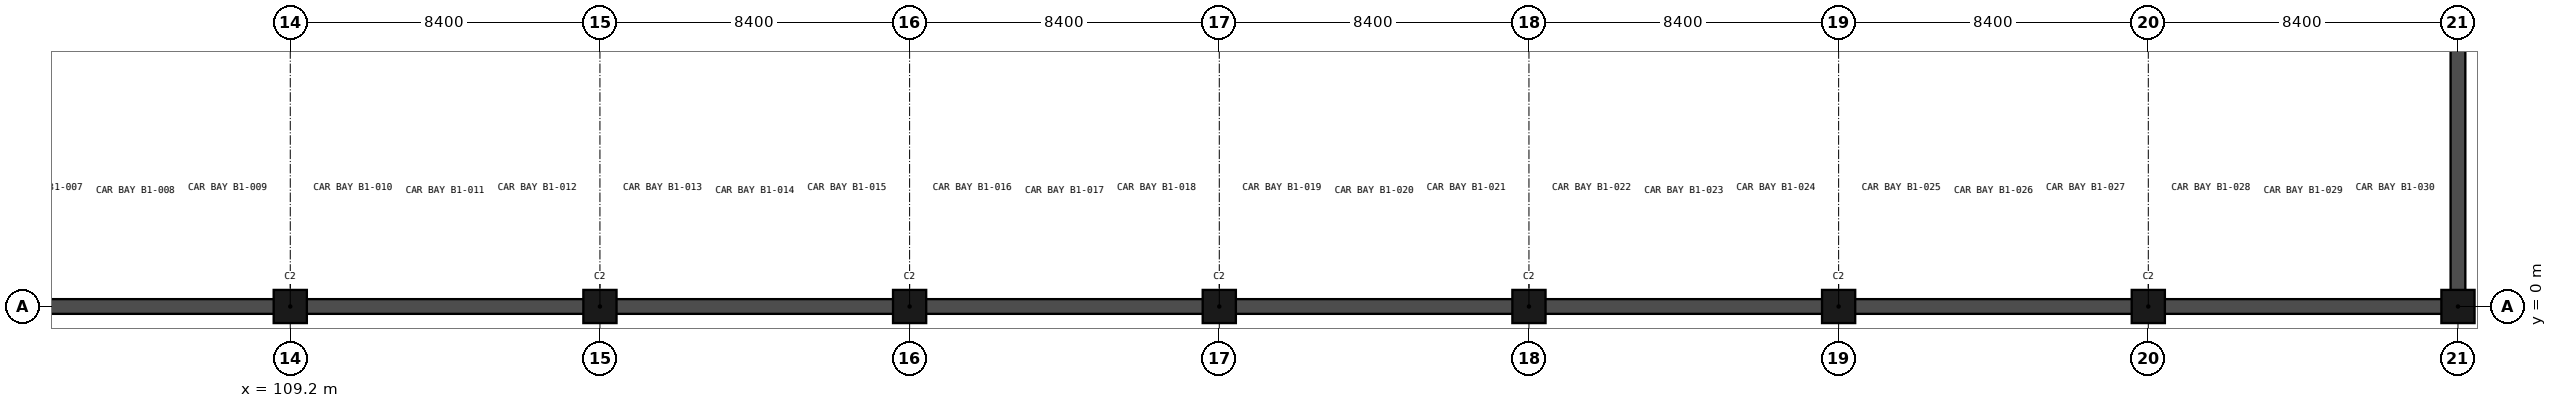
"""IFC4 building model, lengths in metres.
Left out: names, types, materials, properties, quantities, classifications, styles, units other than length and angle.
Written with IfcOpenShell. Run it as: python <this file> out.ifc"""

import sys

from ifc_helpers import new_model, si_unit, direction, frame, frame_2d, origin, origin_2d, place, context, subcontext, project, spatial, rectangle, extrude, element, save


model = new_model("IFC4")
c1 = context("Model", 3, precision=1e-05, world=origin(), true_north=direction((0.0, 1.0)))
c2 = subcontext(c1, "Body", "Model", "MODEL_VIEW")
j1 = project(units=[si_unit("LENGTHUNIT", "METRE"), si_unit("PLANEANGLEUNIT", "RADIAN")], contexts=[c1])
p1 = place(None, origin())
s1 = spatial("IfcSite", under=j1, at=p1, CompositionType="ELEMENT")
p2 = place(p1, origin())
s2 = spatial("IfcBuilding", under=s1, at=p2, CompositionType="ELEMENT")
p3 = place(p2, frame((0.0, 0.0, -4.8)))
s3 = spatial("IfcBuildingStorey", under=s2, at=p3, CompositionType="ELEMENT", Elevation=-4.8)
for number, where, z_axis, x_axis in (
    (1, (109.2, 0.0, -0.3), (0.0, 0.0, 1.0), (1.0, 0.0, 0.0)),
    (2, (117.6, 0.0, -0.3), (0.0, 0.0, 1.0), (1.0, 0.0, 0.0)),
    (3, (126.0, 0.0, -0.3), (0.0, 0.0, 1.0), (1.0, 0.0, 0.0)),
    (4, (134.4, 0.0, -0.3), (0.0, 0.0, 1.0), (1.0, 0.0, 0.0)),
    (5, (142.8, 0.0, -0.3), (0.0, 0.0, 1.0), (1.0, 0.0, 0.0)),
    (6, (151.2, 0.0, -0.3), (0.0, 0.0, 1.0), (1.0, 0.0, 0.0)),
    (7, (159.6, 0.0, -0.3), (0.0, 0.0, 1.0), (1.0, 0.0, 0.0)),
    (8, (168.0, 0.0, -0.3), (0.0, 0.0, 1.0), (1.0, 0.0, 0.0)),
):
    element("IfcColumn", number, at=place(p3, frame(where, z_axis=z_axis, x_axis=x_axis)), inside=s3, PredefinedType="COLUMN", context=c2, shape_type="SweptSolid", body=[
        extrude(rectangle(XDim=0.9, YDim=0.9, at=origin_2d()), origin(), (0.0, 0.0, 1.0), 4.8),
    ])
p4 = place(p3, frame((83.8, 0.0, -0.3), z_axis=(0.0, 0.0, 1.0), x_axis=(1.0, 0.0, 0.0)))
e9 = element("IfcWall", 9, at=p4, inside=s3, PredefinedType="SOLIDWALL", context=c2, shape_type="SweptSolid", body=[
    extrude(rectangle(XDim=84.4, YDim=0.4, at=frame_2d((42.2, 0.0))), origin(), (0.0, 0.0, 1.0), 4.8),
])
p5 = place(p3, frame((168.0, -0.2, -0.3), z_axis=(0.0, 0.0, 1.0), x_axis=(0.0, 1.0, 0.0)))
e10 = element("IfcWall", 10, at=p5, inside=s3, PredefinedType="SOLIDWALL", context=c2, shape_type="SweptSolid", body=[
    extrude(rectangle(XDim=118.0, YDim=0.4, at=frame_2d((59.0, 0.0))), origin(), (0.0, 0.0, 1.0), 4.8),
])
save(model, sys.argv[1])
